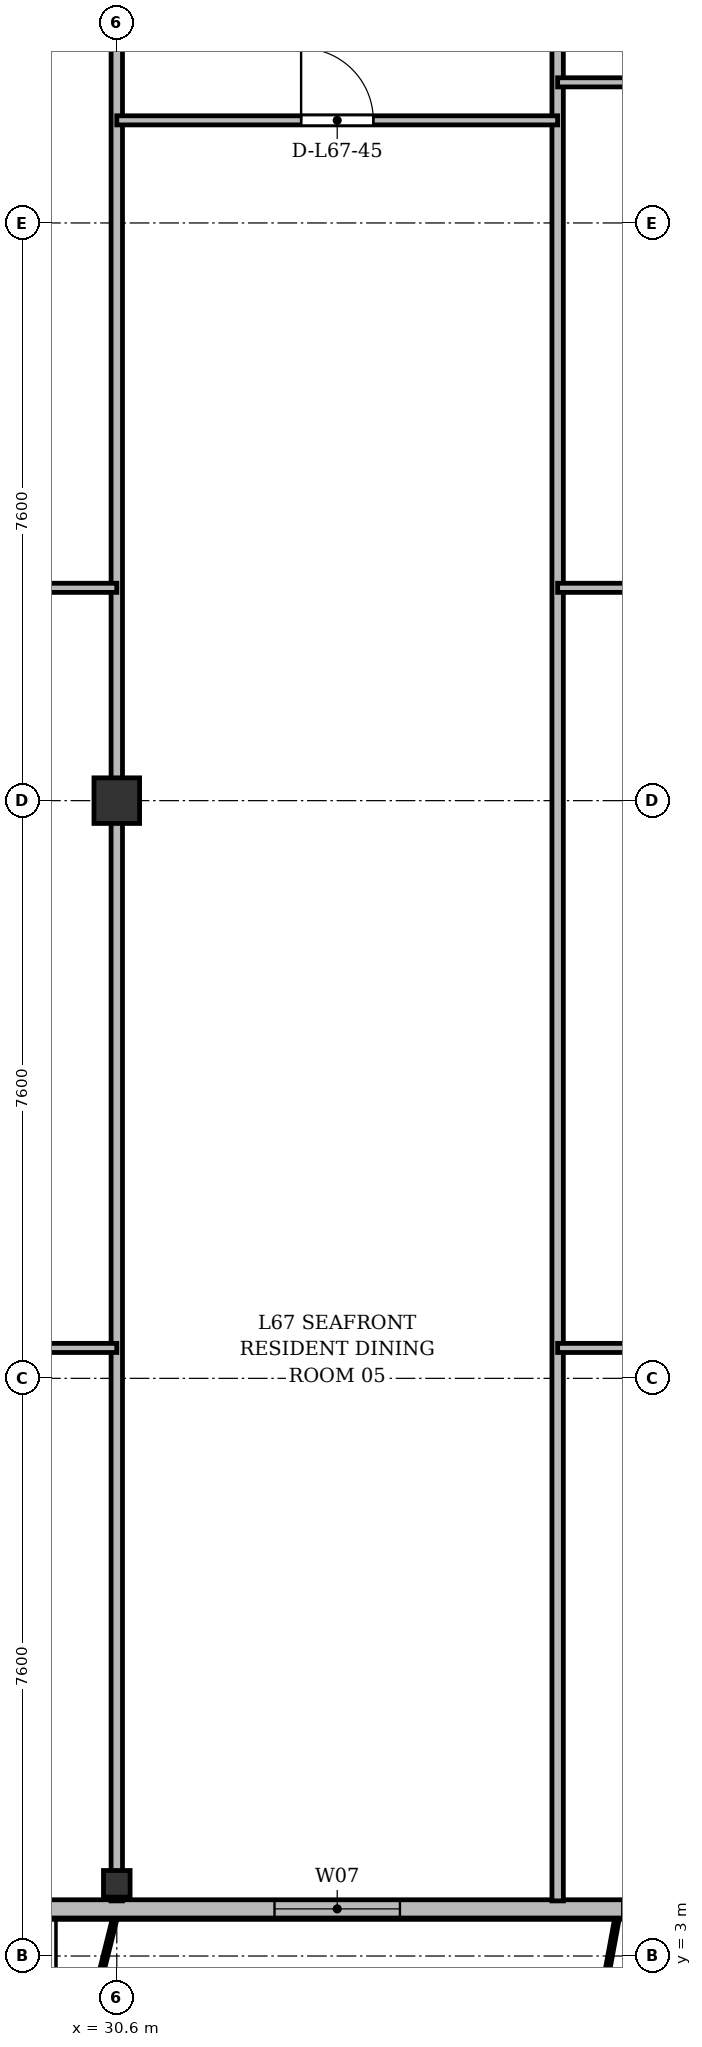
"""IFC4 building model, lengths in metres.
Left out: names, types, materials, properties, quantities, classifications, styles, units other than length and angle.
Written with IfcOpenShell. Run it as: python <this file> out.ifc"""

import sys

from ifc_helpers import new_model, si_unit, direction, frame, frame_2d, origin, origin_2d, place, context, subcontext, project, spatial, rectangle, i_section, extrude, source, transform, mapped, element, fill, save


model = new_model("IFC4")
c1 = context("Model", 3, precision=1e-05, world=origin(), true_north=direction((0.0, 1.0)))
c2 = subcontext(c1, "Body", "Model", "MODEL_VIEW")
j1 = project(units=[si_unit("LENGTHUNIT", "METRE"), si_unit("PLANEANGLEUNIT", "RADIAN")], contexts=[c1])
p1 = place(None, origin())
s1 = spatial("IfcSite", under=j1, at=p1, CompositionType="ELEMENT")
p2 = place(p1, origin())
s2 = spatial("IfcBuilding", under=s1, at=p2, CompositionType="ELEMENT")
p3 = place(p2, frame((0.0, 0.0, 259.5)))
s3 = spatial("IfcBuildingStorey", under=s2, at=p3, CompositionType="ELEMENT", Elevation=259.5)
m1 = source(origin(), c2, "Body", "SweptSolid", [
    extrude(i_section(OverallWidth=0.35, OverallDepth=0.35, WebThickness=0.018, FlangeThickness=0.028, at=origin_2d()), origin(), (0.0, 0.0, 1.0), 3.6),
])
p4 = place(p3, frame((30.6, 3.95, 0.0), z_axis=(0.0, 0.0, 1.0), x_axis=(1.0, 0.0, 0.0)))
e1 = element("IfcColumn", 1, at=p4, inside=s3, PredefinedType="COLUMN", context=c2, shape_type="MappedRepresentation", body=[
    mapped(m1, transform((0.0, 0.0, 0.0), x_axis=(1.0, 0.0, 0.0), y_axis=(0.0, 1.0, 0.0), z_axis=(0.0, 0.0, 1.0), scale=1.0)),
])
m2 = source(origin(), c2, "Body", "SweptSolid", [
    extrude(rectangle(XDim=0.6, YDim=0.6, at=origin_2d()), origin(), (0.0, 0.0, 1.0), 3.6),
])
p5 = place(p3, frame((30.6, 18.2, 0.0), z_axis=(0.0, 0.0, 1.0), x_axis=(1.0, 0.0, 0.0)))
e2 = element("IfcColumn", 2, at=p5, inside=s3, PredefinedType="COLUMN", context=c2, shape_type="MappedRepresentation", body=[
    mapped(m2, transform((0.0, 0.0, 0.0), x_axis=(1.0, 0.0, 0.0), y_axis=(0.0, 1.0, 0.0), z_axis=(0.0, 0.0, 1.0), scale=1.0)),
])
p6 = place(p3, frame((63.2, 3.62, 0.0), z_axis=(0.0, 0.0, 1.0), x_axis=(-1.0, 0.0, 0.0)))
e3 = element("IfcWall", 3, at=p6, inside=s3, PredefinedType="SOLIDWALL", context=c2, shape_type="SweptSolid", body=[
    extrude(rectangle(XDim=52.0, YDim=0.24, at=frame_2d((26.0, 0.0))), origin(), (0.0, 0.0, 1.0), 3.37),
])
p7 = place(p6, frame((0.345, 0.0, 0.9)))
e4 = element("IfcOpeningElement", 4, at=p7, cuts=e3, PredefinedType="OPENING", context=c2, shape_type="SweptSolid", body=[
    extrude(rectangle(XDim=1.2, YDim=1.65, at=frame_2d((0.6, 0.825))), frame((0.0, 0.13, 0.0), z_axis=(0.0, -1.0, 0.0), x_axis=(1.0, 0.0, 0.0)), (0.0, 0.0, 1.0), 0.26),
])
p8 = place(p6, frame((2.05, 0.0, 0.9)))
e5 = element("IfcOpeningElement", 5, at=p8, cuts=e3, PredefinedType="OPENING", context=c2, shape_type="SweptSolid", body=[
    extrude(rectangle(XDim=2.0, YDim=1.95, at=frame_2d((1.0, 0.975))), frame((0.0, 0.13, 0.0), z_axis=(0.0, -1.0, 0.0), x_axis=(1.0, 0.0, 0.0)), (0.0, 0.0, 1.0), 0.26),
])
p9 = place(p6, frame((5.42, 0.0, 0.0)))
e6 = element("IfcOpeningElement", 6, at=p9, cuts=e3, PredefinedType="OPENING", context=c2, shape_type="SweptSolid", body=[
    extrude(rectangle(XDim=1.2, YDim=2.2, at=frame_2d((0.6, 1.1))), frame((0.0, 0.13, 0.0), z_axis=(0.0, -1.0, 0.0), x_axis=(1.0, 0.0, 0.0)), (0.0, 0.0, 1.0), 0.26),
])
p10 = place(p6, frame((8.6, 0.0, 0.9)))
e7 = element("IfcOpeningElement", 7, at=p10, cuts=e3, PredefinedType="OPENING", context=c2, shape_type="SweptSolid", body=[
    extrude(rectangle(XDim=1.8, YDim=1.8, at=frame_2d((0.9, 0.9))), frame((0.0, 0.13, 0.0), z_axis=(0.0, -1.0, 0.0), x_axis=(1.0, 0.0, 0.0)), (0.0, 0.0, 1.0), 0.26),
])
p11 = place(p6, frame((14.7, 0.0, 0.9)))
e8 = element("IfcOpeningElement", 8, at=p11, cuts=e3, PredefinedType="OPENING", context=c2, shape_type="SweptSolid", body=[
    extrude(rectangle(XDim=2.2, YDim=1.8, at=frame_2d((1.1, 0.9))), frame((0.0, 0.13, 0.0), z_axis=(0.0, -1.0, 0.0), x_axis=(1.0, 0.0, 0.0)), (0.0, 0.0, 1.0), 0.26),
])
p12 = place(p6, frame((20.5, 0.0, 0.9)))
e9 = element("IfcOpeningElement", 9, at=p12, cuts=e3, PredefinedType="OPENING", context=c2, shape_type="SweptSolid", body=[
    extrude(rectangle(XDim=1.5, YDim=1.75, at=frame_2d((0.75, 0.875))), frame((0.0, 0.13, 0.0), z_axis=(0.0, -1.0, 0.0), x_axis=(1.0, 0.0, 0.0)), (0.0, 0.0, 1.0), 0.26),
])
p13 = place(p6, frame((23.95, 0.0, 0.9)))
e10 = element("IfcOpeningElement", 10, at=p13, cuts=e3, PredefinedType="OPENING", context=c2, shape_type="SweptSolid", body=[
    extrude(rectangle(XDim=2.0, YDim=1.95, at=frame_2d((1.0, 0.975))), frame((0.0, 0.13, 0.0), z_axis=(0.0, -1.0, 0.0), x_axis=(1.0, 0.0, 0.0)), (0.0, 0.0, 1.0), 0.26),
])
p14 = place(p6, frame((28.875, 0.0, 0.9)))
e11 = element("IfcOpeningElement", 11, at=p14, cuts=e3, PredefinedType="OPENING", context=c2, shape_type="SweptSolid", body=[
    extrude(rectangle(XDim=1.65, YDim=1.85, at=frame_2d((0.825, 0.925))), frame((0.0, 0.13, 0.0), z_axis=(0.0, -1.0, 0.0), x_axis=(1.0, 0.0, 0.0)), (0.0, 0.0, 1.0), 0.26),
])
p15 = place(p6, frame((34.078, 0.0, 0.0)))
e12 = element("IfcOpeningElement", 12, at=p15, cuts=e3, PredefinedType="OPENING", context=c2, shape_type="SweptSolid", body=[
    extrude(rectangle(XDim=1.2, YDim=2.2, at=frame_2d((0.6, 1.1))), frame((0.0, 0.13, 0.0), z_axis=(0.0, -1.0, 0.0), x_axis=(1.0, 0.0, 0.0)), (0.0, 0.0, 1.0), 0.26),
])
p16 = place(p6, frame((36.9, 0.0, 0.9)))
e13 = element("IfcOpeningElement", 13, at=p16, cuts=e3, PredefinedType="OPENING", context=c2, shape_type="SweptSolid", body=[
    extrude(rectangle(XDim=2.2, YDim=1.8, at=frame_2d((1.1, 0.9))), frame((0.0, 0.13, 0.0), z_axis=(0.0, -1.0, 0.0), x_axis=(1.0, 0.0, 0.0)), (0.0, 0.0, 1.0), 0.26),
])
p17 = place(p6, frame((41.15, 0.0, 0.9)))
e14 = element("IfcOpeningElement", 14, at=p17, cuts=e3, PredefinedType="OPENING", context=c2, shape_type="SweptSolid", body=[
    extrude(rectangle(XDim=1.5, YDim=1.75, at=frame_2d((0.75, 0.875))), frame((0.0, 0.13, 0.0), z_axis=(0.0, -1.0, 0.0), x_axis=(1.0, 0.0, 0.0)), (0.0, 0.0, 1.0), 0.26),
])
p18 = place(p6, frame((44.19, 0.0, 0.9)))
e15 = element("IfcOpeningElement", 15, at=p18, cuts=e3, PredefinedType="OPENING", context=c2, shape_type="SweptSolid", body=[
    extrude(rectangle(XDim=2.0, YDim=1.95, at=frame_2d((1.0, 0.975))), frame((0.0, 0.13, 0.0), z_axis=(0.0, -1.0, 0.0), x_axis=(1.0, 0.0, 0.0)), (0.0, 0.0, 1.0), 0.26),
])
p19 = place(p6, frame((49.93, 0.0, 0.9)))
e16 = element("IfcOpeningElement", 16, at=p19, cuts=e3, PredefinedType="OPENING", context=c2, shape_type="SweptSolid", body=[
    extrude(rectangle(XDim=1.65, YDim=1.85, at=frame_2d((0.825, 0.925))), frame((0.0, 0.13, 0.0), z_axis=(0.0, -1.0, 0.0), x_axis=(1.0, 0.0, 0.0)), (0.0, 0.0, 1.0), 0.26),
])
p20 = place(p3, frame((30.6, 3.725, 0.0), z_axis=(0.0, 0.0, 1.0), x_axis=(0.0, 1.0, 0.0)))
e17 = element("IfcWall", 17, at=p20, inside=s3, PredefinedType="PARTITIONING", context=c2, shape_type="SweptSolid", body=[
    extrude(rectangle(XDim=27.275, YDim=0.15, at=frame_2d((13.637, 0.0))), origin(), (0.0, 0.0, 1.0), 2.87),
])
p21 = place(p3, frame((36.4, 3.725, 0.0), z_axis=(0.0, 0.0, 1.0), x_axis=(0.0, 1.0, 0.0)))
e18 = element("IfcWall", 18, at=p21, inside=s3, PredefinedType="PARTITIONING", context=c2, shape_type="SweptSolid", body=[
    extrude(rectangle(XDim=27.275, YDim=0.15, at=frame_2d((13.637, 0.0))), origin(), (0.0, 0.0, 1.0), 2.92),
])
p22 = place(p3, frame((23.4, 21.0, 0.0), z_axis=(0.0, 0.0, 1.0), x_axis=(1.0, 0.0, 0.0)))
e19 = element("IfcWall", 19, at=p22, inside=s3, PredefinedType="PARTITIONING", context=c2, shape_type="SweptSolid", body=[
    extrude(rectangle(XDim=7.2, YDim=0.12, at=frame_2d((3.6, 0.0))), origin(), (0.0, 0.0, 1.0), 2.87),
])
p23 = place(p22, frame((3.125, 0.0, 0.0)))
e20 = element("IfcOpeningElement", 20, at=p23, cuts=e19, PredefinedType="OPENING", context=c2, shape_type="SweptSolid", body=[
    extrude(rectangle(XDim=0.95, YDim=2.15, at=frame_2d((0.475, 1.075))), frame((0.0, 0.07, 0.0), z_axis=(0.0, -1.0, 0.0), x_axis=(1.0, 0.0, 0.0)), (0.0, 0.0, 1.0), 0.14),
])
p24 = place(p3, frame((27.0, 11.0, 0.0), z_axis=(0.0, 0.0, 1.0), x_axis=(1.0, 0.0, 0.0)))
e21 = element("IfcWall", 21, at=p24, inside=s3, PredefinedType="PARTITIONING", context=c2, shape_type="SweptSolid", body=[
    extrude(rectangle(XDim=3.6, YDim=0.12, at=frame_2d((1.8, 0.0))), origin(), (0.0, 0.0, 1.0), 2.87),
])
p25 = place(p24, frame((1.325, 0.0, 0.0)))
e22 = element("IfcOpeningElement", 22, at=p25, cuts=e21, PredefinedType="OPENING", context=c2, shape_type="SweptSolid", body=[
    extrude(rectangle(XDim=0.95, YDim=2.15, at=frame_2d((0.475, 1.075))), frame((0.0, 0.07, 0.0), z_axis=(0.0, -1.0, 0.0), x_axis=(1.0, 0.0, 0.0)), (0.0, 0.0, 1.0), 0.14),
])
p26 = place(p3, frame((30.6, 27.15, 0.0), z_axis=(0.0, 0.0, 1.0), x_axis=(1.0, 0.0, 0.0)))
e23 = element("IfcWall", 23, at=p26, inside=s3, PredefinedType="PARTITIONING", context=c2, shape_type="SweptSolid", body=[
    extrude(rectangle(XDim=5.8, YDim=0.12, at=frame_2d((2.9, 0.0))), origin(), (0.0, 0.0, 1.0), 2.87),
])
p27 = place(p26, frame((2.425, 0.0, 0.0)))
e24 = element("IfcOpeningElement", 24, at=p27, cuts=e23, PredefinedType="OPENING", context=c2, shape_type="SweptSolid", body=[
    extrude(rectangle(XDim=0.95, YDim=2.15, at=frame_2d((0.475, 1.075))), frame((0.0, 0.07, 0.0), z_axis=(0.0, -1.0, 0.0), x_axis=(1.0, 0.0, 0.0)), (0.0, 0.0, 1.0), 0.14),
])
p28 = place(p3, frame((36.4, 21.0, 0.0), z_axis=(0.0, 0.0, 1.0), x_axis=(1.0, 0.0, 0.0)))
e25 = element("IfcWall", 25, at=p28, inside=s3, PredefinedType="PARTITIONING", context=c2, shape_type="SweptSolid", body=[
    extrude(rectangle(XDim=7.4, YDim=0.12, at=frame_2d((3.7, 0.0))), origin(), (0.0, 0.0, 1.0), 2.87),
])
p29 = place(p28, frame((3.133, 0.0, 0.0)))
e26 = element("IfcOpeningElement", 26, at=p29, cuts=e25, PredefinedType="OPENING", context=c2, shape_type="SweptSolid", body=[
    extrude(rectangle(XDim=0.95, YDim=2.15, at=frame_2d((0.475, 1.075))), frame((0.0, 0.07, 0.0), z_axis=(0.0, -1.0, 0.0), x_axis=(1.0, 0.0, 0.0)), (0.0, 0.0, 1.0), 0.14),
])
p30 = place(p3, frame((36.4, 27.65, 0.0), z_axis=(0.0, 0.0, 1.0), x_axis=(1.0, 0.0, 0.0)))
e27 = element("IfcWall", 27, at=p30, inside=s3, PredefinedType="PARTITIONING", context=c2, shape_type="SweptSolid", body=[
    extrude(rectangle(XDim=2.4, YDim=0.12, at=frame_2d((1.2, 0.0))), origin(), (0.0, 0.0, 1.0), 3.37),
])
p31 = place(p3, frame((36.4, 11.0, 0.0), z_axis=(0.0, 0.0, 1.0), x_axis=(1.0, 0.0, 0.0)))
e28 = element("IfcWall", 28, at=p31, inside=s3, PredefinedType="PARTITIONING", context=c2, shape_type="SweptSolid", body=[
    extrude(rectangle(XDim=3.7, YDim=0.12, at=frame_2d((1.85, 0.0))), origin(), (0.0, 0.0, 1.0), 3.37),
])
p32 = place(p31, frame((1.285, 0.0, 0.0)))
e29 = element("IfcOpeningElement", 29, at=p32, cuts=e28, PredefinedType="OPENING", context=c2, shape_type="SweptSolid", body=[
    extrude(rectangle(XDim=0.95, YDim=2.15, at=frame_2d((0.475, 1.075))), frame((0.0, 0.07, 0.0), z_axis=(0.0, -1.0, 0.0), x_axis=(1.0, 0.0, 0.0)), (0.0, 0.0, 1.0), 0.14),
])
m3 = source(origin(), c2, "Body", "SweptSolid", [
    extrude(rectangle(XDim=1.65, YDim=1.85, at=frame_2d((0.825, 0.925))), frame((0.0, 0.03, 0.0), z_axis=(0.0, -1.0, 0.0), x_axis=(1.0, 0.0, 0.0)), (0.0, 0.0, 1.0), 0.06),
])
p33 = place(p14, origin())
e30 = element("IfcWindow", 30, at=p33, inside=s3, PartitioningType="SINGLE_PANEL", PredefinedType="WINDOW", context=c2, shape_type="MappedRepresentation", body=[
    mapped(m3, transform((0.0, 0.0, 0.0), x_axis=(1.0, 0.0, 0.0), y_axis=(0.0, 1.0, 0.0), z_axis=(0.0, 0.0, 1.0), scale=1.0)),
])
fill(e11, e30)
m4 = source(origin(), c2, "Body", "SweptSolid", [
    extrude(rectangle(XDim=0.95, YDim=2.15, at=frame_2d((0.475, 1.075))), frame((0.0, 0.025, 0.0), z_axis=(0.0, -1.0, 0.0), x_axis=(1.0, 0.0, 0.0)), (0.0, 0.0, 1.0), 0.05),
])
p34 = place(p27, origin())
e31 = element("IfcDoor", 31, at=p34, inside=s3, OperationType="SINGLE_SWING_LEFT", PredefinedType="DOOR", context=c2, shape_type="MappedRepresentation", body=[
    mapped(m4, transform((0.0, 0.0, 0.0), x_axis=(1.0, 0.0, 0.0), y_axis=(0.0, 1.0, 0.0), z_axis=(0.0, 0.0, 1.0), scale=1.0)),
])
fill(e24, e31)
save(model, sys.argv[1])
